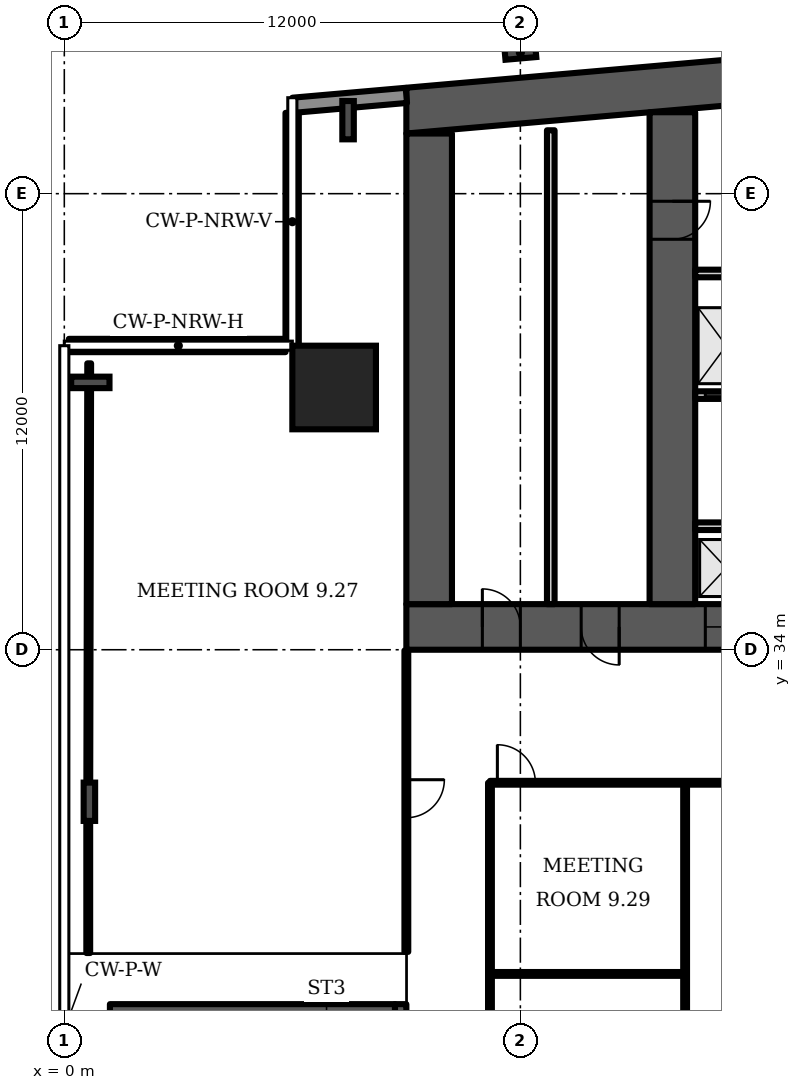
"""IFC4 building model, lengths in metres.
Left out: names, types, materials, properties, quantities, classifications, styles, units other than length and angle.
Written with IfcOpenShell. Run it as: python <this file> out.ifc"""

import sys

from ifc_helpers import new_model, si_unit, direction, frame, frame_2d, origin, origin_2d, place, context, subcontext, project, spatial, polyline, rectangle, i_section, outline, extrude, element, fill, save


model = new_model("IFC4")
c1 = context("Model", 3, precision=1e-05, world=origin(), true_north=direction((0.0, 1.0)))
c2 = subcontext(c1, "Body", "Model", "MODEL_VIEW")
j1 = project(units=[si_unit("LENGTHUNIT", "METRE"), si_unit("PLANEANGLEUNIT", "RADIAN")], contexts=[c1])
p1 = place(None, origin())
s1 = spatial("IfcSite", under=j1, at=p1, CompositionType="ELEMENT")
p2 = place(p1, origin())
s2 = spatial("IfcBuilding", under=s1, at=p2, CompositionType="ELEMENT")
p3 = place(p2, frame((0.0, 0.0, 52.3)))
s3 = spatial("IfcBuildingStorey", under=s2, at=p3, CompositionType="ELEMENT", Elevation=52.3)
p4 = place(p3, frame((0.0, 0.0, -0.0)))
e1 = element("IfcWall", 1, at=p4, inside=s3, PredefinedType="SHEAR", context=c2, shape_type="SweptSolid", body=[
    extrude(outline(polyline([(9.0, 47.583), (37.0, 50.032), (65.0, 47.583), (65.0, 48.787), (37.0, 51.237), (9.0, 48.787), (9.0, 47.583)])), origin(), (0.0, 0.0, 1.0), 3.6),
])
p5 = place(p3, frame((9.0, 34.6, 0.0), z_axis=(0.0, 0.0, 1.0), x_axis=(1.0, 0.0, 0.0)))
e2 = element("IfcWall", 2, at=p5, inside=s3, PredefinedType="SHEAR", context=c2, shape_type="SweptSolid", body=[
    extrude(rectangle(XDim=56.0, YDim=1.2, at=frame_2d((28.0, 0.0))), origin(), (0.0, 0.0, 1.0), 3.6),
])
p6 = place(p5, frame((2.0, 0.0, 0.0)))
e3 = element("IfcOpeningElement", 3, at=p6, cuts=e2, PredefinedType="OPENING", context=c2, shape_type="SweptSolid", body=[
    extrude(rectangle(XDim=1.0, YDim=2.1, at=frame_2d((0.5, 1.05))), frame((0.0, 0.61, 0.0), z_axis=(0.0, -1.0, 0.0), x_axis=(1.0, 0.0, 0.0)), (0.0, 0.0, 1.0), 1.22),
])
p7 = place(p5, frame((4.6, 0.0, 0.0)))
e4 = element("IfcOpeningElement", 4, at=p7, cuts=e2, PredefinedType="OPENING", context=c2, shape_type="SweptSolid", body=[
    extrude(rectangle(XDim=1.0, YDim=2.1, at=frame_2d((0.5, 1.05))), frame((0.0, 0.61, 0.0), z_axis=(0.0, -1.0, 0.0), x_axis=(1.0, 0.0, 0.0)), (0.0, 0.0, 1.0), 1.22),
])
p8 = place(p5, frame((7.867, 0.0, 0.0)))
e5 = element("IfcOpeningElement", 5, at=p8, cuts=e2, PredefinedType="OPENING", context=c2, shape_type="SweptSolid", body=[
    extrude(rectangle(XDim=1.1, YDim=2.1, at=frame_2d((0.55, 1.05))), frame((0.0, 0.61, 0.0), z_axis=(0.0, -1.0, 0.0), x_axis=(1.0, 0.0, 0.0)), (0.0, 0.0, 1.0), 1.22),
])
p9 = place(p5, frame((12.033, 0.0, 0.0)))
e6 = element("IfcOpeningElement", 6, at=p9, cuts=e2, PredefinedType="OPENING", context=c2, shape_type="SweptSolid", body=[
    extrude(rectangle(XDim=1.1, YDim=2.1, at=frame_2d((0.55, 1.05))), frame((0.0, 0.61, 0.0), z_axis=(0.0, -1.0, 0.0), x_axis=(1.0, 0.0, 0.0)), (0.0, 0.0, 1.0), 1.22),
])
p10 = place(p5, frame((9.8, 0.0, 0.0)))
e7 = element("IfcOpeningElement", 7, at=p10, cuts=e2, PredefinedType="OPENING", context=c2, shape_type="SweptSolid", body=[
    extrude(rectangle(XDim=1.4, YDim=2.1, at=frame_2d((0.7, 1.05))), frame((0.0, 0.61, 0.0), z_axis=(0.0, -1.0, 0.0), x_axis=(1.0, 0.0, 0.0)), (0.0, 0.0, 1.0), 1.22),
])
p11 = place(p5, frame((14.65, 0.0, 0.0)))
e8 = element("IfcOpeningElement", 8, at=p11, cuts=e2, PredefinedType="OPENING", context=c2, shape_type="SweptSolid", body=[
    extrude(rectangle(XDim=1.2, YDim=2.1, at=frame_2d((0.6, 1.05))), frame((0.0, 0.61, 0.0), z_axis=(0.0, -1.0, 0.0), x_axis=(1.0, 0.0, 0.0)), (0.0, 0.0, 1.0), 1.22),
])
p12 = place(p5, frame((21.867, 0.0, 0.0)))
e9 = element("IfcOpeningElement", 9, at=p12, cuts=e2, PredefinedType="OPENING", context=c2, shape_type="SweptSolid", body=[
    extrude(rectangle(XDim=1.1, YDim=2.1, at=frame_2d((0.55, 1.05))), frame((0.0, 0.61, 0.0), z_axis=(0.0, -1.0, 0.0), x_axis=(1.0, 0.0, 0.0)), (0.0, 0.0, 1.0), 1.22),
])
p13 = place(p5, frame((26.033, 0.0, 0.0)))
e10 = element("IfcOpeningElement", 10, at=p13, cuts=e2, PredefinedType="OPENING", context=c2, shape_type="SweptSolid", body=[
    extrude(rectangle(XDim=1.1, YDim=2.1, at=frame_2d((0.55, 1.05))), frame((0.0, 0.61, 0.0), z_axis=(0.0, -1.0, 0.0), x_axis=(1.0, 0.0, 0.0)), (0.0, 0.0, 1.0), 1.22),
])
p14 = place(p5, frame((23.8, 0.0, 0.0)))
e11 = element("IfcOpeningElement", 11, at=p14, cuts=e2, PredefinedType="OPENING", context=c2, shape_type="SweptSolid", body=[
    extrude(rectangle(XDim=1.4, YDim=2.1, at=frame_2d((0.7, 1.05))), frame((0.0, 0.61, 0.0), z_axis=(0.0, -1.0, 0.0), x_axis=(1.0, 0.0, 0.0)), (0.0, 0.0, 1.0), 1.22),
])
p15 = place(p5, frame((28.867, 0.0, 0.0)))
e12 = element("IfcOpeningElement", 12, at=p15, cuts=e2, PredefinedType="OPENING", context=c2, shape_type="SweptSolid", body=[
    extrude(rectangle(XDim=1.1, YDim=2.1, at=frame_2d((0.55, 1.05))), frame((0.0, 0.61, 0.0), z_axis=(0.0, -1.0, 0.0), x_axis=(1.0, 0.0, 0.0)), (0.0, 0.0, 1.0), 1.22),
])
p16 = place(p5, frame((33.033, 0.0, 0.0)))
e13 = element("IfcOpeningElement", 13, at=p16, cuts=e2, PredefinedType="OPENING", context=c2, shape_type="SweptSolid", body=[
    extrude(rectangle(XDim=1.1, YDim=2.1, at=frame_2d((0.55, 1.05))), frame((0.0, 0.61, 0.0), z_axis=(0.0, -1.0, 0.0), x_axis=(1.0, 0.0, 0.0)), (0.0, 0.0, 1.0), 1.22),
])
p17 = place(p5, frame((40.15, 0.0, 0.0)))
e14 = element("IfcOpeningElement", 14, at=p17, cuts=e2, PredefinedType="OPENING", context=c2, shape_type="SweptSolid", body=[
    extrude(rectangle(XDim=1.2, YDim=2.1, at=frame_2d((0.6, 1.05))), frame((0.0, 0.61, 0.0), z_axis=(0.0, -1.0, 0.0), x_axis=(1.0, 0.0, 0.0)), (0.0, 0.0, 1.0), 1.22),
])
p18 = place(p5, frame((44.8, 0.0, 0.0)))
e15 = element("IfcOpeningElement", 15, at=p18, cuts=e2, PredefinedType="OPENING", context=c2, shape_type="SweptSolid", body=[
    extrude(rectangle(XDim=1.4, YDim=2.1, at=frame_2d((0.7, 1.05))), frame((0.0, 0.61, 0.0), z_axis=(0.0, -1.0, 0.0), x_axis=(1.0, 0.0, 0.0)), (0.0, 0.0, 1.0), 1.22),
])
p19 = place(p5, frame((49.867, 0.0, 0.0)))
e16 = element("IfcOpeningElement", 16, at=p19, cuts=e2, PredefinedType="OPENING", context=c2, shape_type="SweptSolid", body=[
    extrude(rectangle(XDim=1.1, YDim=2.1, at=frame_2d((0.55, 1.05))), frame((0.0, 0.61, 0.0), z_axis=(0.0, -1.0, 0.0), x_axis=(1.0, 0.0, 0.0)), (0.0, 0.0, 1.0), 1.22),
])
p20 = place(p5, frame((53.5, 0.0, 0.0)))
e17 = element("IfcOpeningElement", 17, at=p20, cuts=e2, PredefinedType="OPENING", context=c2, shape_type="SweptSolid", body=[
    extrude(rectangle(XDim=1.1, YDim=2.1, at=frame_2d((0.55, 1.05))), frame((0.0, 0.61, 0.0), z_axis=(0.0, -1.0, 0.0), x_axis=(1.0, 0.0, 0.0)), (0.0, 0.0, 1.0), 1.22),
])
p21 = place(p5, frame((51.567, 0.0, 0.0)))
e18 = element("IfcOpeningElement", 18, at=p21, cuts=e2, PredefinedType="OPENING", context=c2, shape_type="SweptSolid", body=[
    extrude(rectangle(XDim=1.4, YDim=2.1, at=frame_2d((0.7, 1.05))), frame((0.0, 0.61, 0.0), z_axis=(0.0, -1.0, 0.0), x_axis=(1.0, 0.0, 0.0)), (0.0, 0.0, 1.0), 1.22),
])
p22 = place(p3, frame((9.6, 35.2, 0.0), z_axis=(0.0, 0.0, 1.0), x_axis=(0.0, 1.0, 0.0)))
e19 = element("IfcWall", 19, at=p22, inside=s3, PredefinedType="SHEAR", context=c2, shape_type="SweptSolid", body=[
    extrude(rectangle(XDim=12.383, YDim=1.2, at=frame_2d((6.191, 0.0))), origin(), (0.0, 0.0, 1.0), 3.6),
])
p23 = place(p3, frame((16.0, 35.2, 0.0), z_axis=(0.0, 0.0, 1.0), x_axis=(0.0, 1.0, 0.0)))
e20 = element("IfcWall", 20, at=p23, inside=s3, PredefinedType="SHEAR", context=c2, shape_type="SweptSolid", body=[
    extrude(rectangle(XDim=12.943, YDim=1.2, at=frame_2d((6.471, 0.0))), origin(), (0.0, 0.0, 1.0), 3.6),
])
p24 = place(p23, frame((9.6, 0.0, 0.0)))
e21 = element("IfcOpeningElement", 21, at=p24, cuts=e20, PredefinedType="OPENING", context=c2, shape_type="SweptSolid", body=[
    extrude(rectangle(XDim=1.0, YDim=2.1, at=frame_2d((0.5, 1.05))), frame((0.0, 0.61, 0.0), z_axis=(0.0, -1.0, 0.0), x_axis=(1.0, 0.0, 0.0)), (0.0, 0.0, 1.0), 1.22),
])
p25 = place(p3, frame((7.1, 40.9, 0.0), z_axis=(0.0, 0.0, 1.0), x_axis=(1.0, 0.0, 0.0)))
e22 = element("IfcColumn", 22, at=p25, inside=s3, PredefinedType="COLUMN", context=c2, shape_type="SweptSolid", body=[
    extrude(rectangle(XDim=2.2, YDim=2.2, at=origin_2d()), origin(), (0.0, 0.0, 1.0), 3.6),
])
for number, where, z_axis, x_axis in (
    (23, (7.467, 47.934, 0.0), (0.0, 0.0, 1.0), (-1.0, 0.0, 0.0)),
    (24, (0.685, 41.034, 0.0), (0.0, 0.0, 1.0), (0.0, 1.0, 0.0)),
    (25, (0.66, 30.0, 0.0), (0.0, 0.0, 1.0), (-1.0, 0.0, 0.0)),
):
    element("IfcColumn", number, at=place(p3, frame(where, z_axis=z_axis, x_axis=x_axis)), inside=s3, PredefinedType="COLUMN", context=c2, shape_type="SweptSolid", body=[
        extrude(i_section(OverallWidth=0.302, OverallDepth=1.008, WebThickness=0.021, FlangeThickness=0.04, FilletRadius=0.03, at=origin_2d()), origin(), (0.0, 0.0, 1.0), 3.6),
    ])
p26 = place(p3, frame((12.0, 49.71, 0.0), z_axis=(0.0, 0.0, 1.0), x_axis=(-0.087156, 0.996197, 0.0)))
e26 = element("IfcColumn", 26, at=p26, inside=s3, PredefinedType="COLUMN", context=c2, shape_type="SweptSolid", body=[
    extrude(i_section(OverallWidth=0.303, OverallDepth=0.814, WebThickness=0.021, FlangeThickness=0.04, FilletRadius=0.03, at=origin_2d()), origin(), (0.0, 0.0, 1.0), 3.6),
])
p27 = place(p3, frame((9.0, 48.587, 0.0), z_axis=(0.0, 0.0, 1.0), x_axis=(-0.996194, -0.087168, 0.0)))
e27 = element("IfcWall", 27, at=p27, inside=s3, PredefinedType="SOLIDWALL", context=c2, shape_type="SweptSolid", body=[
    extrude(rectangle(XDim=2.994, YDim=0.4, at=frame_2d((1.497, 0.0))), origin(), (0.0, 0.0, 1.0), 3.2),
])
p28 = place(p3, frame((5.995, 48.126, 0.0), z_axis=(0.0, 0.0, 1.0), x_axis=(0.0, -1.0, 0.0)))
e28 = element("IfcWall", 28, at=p28, inside=s3, PredefinedType="SOLIDWALL", context=c2, shape_type="SweptSolid", body=[
    extrude(rectangle(XDim=6.126, YDim=0.35, at=frame_2d((3.063, 0.0))), origin(), (0.0, 0.0, 1.0), 1.0),
])
p29 = place(p3, frame((5.82, 42.005, 0.0), z_axis=(0.0, 0.0, 1.0), x_axis=(-1.0, 0.0, 0.0)))
e29 = element("IfcWall", 29, at=p29, inside=s3, PredefinedType="SOLIDWALL", context=c2, shape_type="SweptSolid", body=[
    extrude(rectangle(XDim=5.7, YDim=0.35, at=frame_2d((2.85, 0.0))), origin(), (0.0, 0.0, 1.0), 1.0),
])
p30 = place(p3, frame((12.8, 35.2, 0.0), z_axis=(0.0, 0.0, 1.0), x_axis=(0.0, 1.0, 0.0)))
e30 = element("IfcWall", 30, at=p30, inside=s3, PredefinedType="PARTITIONING", context=c2, shape_type="SweptSolid", body=[
    extrude(rectangle(XDim=12.468, YDim=0.2, at=frame_2d((6.234, 0.0))), origin(), (0.0, 0.0, 1.0), 3.2),
])
p31 = place(p3, frame((16.6, 40.7, 0.0), z_axis=(0.0, 0.0, 1.0), x_axis=(1.0, 0.0, 0.0)))
e31 = element("IfcWall", 31, at=p31, inside=s3, PredefinedType="PARTITIONING", context=c2, shape_type="SweptSolid", body=[
    extrude(rectangle(XDim=5.8, YDim=0.2, at=frame_2d((2.9, 0.0))), origin(), (0.0, 0.0, 1.0), 3.2),
])
p32 = place(p31, frame((0.267, 0.0, 0.0)))
e32 = element("IfcOpeningElement", 32, at=p32, cuts=e31, PredefinedType="OPENING", context=c2, shape_type="SweptSolid", body=[
    extrude(rectangle(XDim=1.1, YDim=2.1, at=frame_2d((0.55, 1.05))), frame((0.0, 0.11, 0.0), z_axis=(0.0, -1.0, 0.0), x_axis=(1.0, 0.0, 0.0)), (0.0, 0.0, 1.0), 0.22),
])
p33 = place(p31, frame((2.35, 0.0, 0.0)))
e33 = element("IfcOpeningElement", 33, at=p33, cuts=e31, PredefinedType="OPENING", context=c2, shape_type="SweptSolid", body=[
    extrude(rectangle(XDim=1.1, YDim=2.1, at=frame_2d((0.55, 1.05))), frame((0.0, 0.11, 0.0), z_axis=(0.0, -1.0, 0.0), x_axis=(1.0, 0.0, 0.0)), (0.0, 0.0, 1.0), 0.22),
])
p34 = place(p31, frame((4.433, 0.0, 0.0)))
e34 = element("IfcOpeningElement", 34, at=p34, cuts=e31, PredefinedType="OPENING", context=c2, shape_type="SweptSolid", body=[
    extrude(rectangle(XDim=1.1, YDim=2.1, at=frame_2d((0.55, 1.05))), frame((0.0, 0.11, 0.0), z_axis=(0.0, -1.0, 0.0), x_axis=(1.0, 0.0, 0.0)), (0.0, 0.0, 1.0), 0.22),
])
p35 = place(p3, frame((0.0, 0.0, -0.0)))
e35 = element("IfcWall", 35, at=p35, inside=s3, PredefinedType="PARTITIONING", context=c2, shape_type="SweptSolid", body=[
    extrude(outline(polyline([(18.233, 37.15), (16.6, 37.15), (16.6, 37.35), (18.233, 37.35), (18.433, 37.35), (18.433, 35.2), (18.233, 35.2), (18.233, 37.15)])), origin(), (0.0, 0.0, 1.0), 3.2),
])
p36 = place(p3, frame((0.0, 0.0, -0.0)))
e36 = element("IfcWall", 36, at=p36, inside=s3, PredefinedType="PARTITIONING", context=c2, shape_type="SweptSolid", body=[
    extrude(outline(polyline([(18.433, 40.8), (18.233, 40.8), (18.233, 43.8), (16.6, 43.8), (16.6, 44.0), (22.4, 44.0), (22.4, 43.8), (20.767, 43.8), (20.767, 40.8), (20.567, 40.8), (20.567, 43.8), (18.433, 43.8), (18.433, 40.8)])), origin(), (0.0, 0.0, 1.0), 3.2),
])
p37 = place(p3, frame((8.85, 20.325, 0.0), z_axis=(0.0, 0.0, 1.0), x_axis=(0.0, 1.0, 0.0)))
e37 = element("IfcWall", 37, at=p37, inside=s3, PredefinedType="SHEAR", context=c2, shape_type="SweptSolid", body=[
    extrude(rectangle(XDim=4.35, YDim=0.3, at=frame_2d((2.175, 0.0))), origin(), (0.0, 0.0, 1.0), 3.2),
])
p38 = place(p37, frame((1.575, 0.0, 0.0)))
e38 = element("IfcOpeningElement", 38, at=p38, cuts=e37, PredefinedType="OPENING", context=c2, shape_type="SweptSolid", body=[
    extrude(rectangle(XDim=1.2, YDim=2.1, at=frame_2d((0.6, 1.05))), frame((0.0, 0.16, 0.0), z_axis=(0.0, -1.0, 0.0), x_axis=(1.0, 0.0, 0.0)), (0.0, 0.0, 1.0), 0.32),
])
p39 = place(p3, frame((0.63, 26.02, 0.0), z_axis=(0.0, 0.0, 1.0), x_axis=(0.0, 1.0, 0.0)))
e39 = element("IfcWall", 39, at=p39, inside=s3, PredefinedType="PARTITIONING", context=c2, shape_type="SweptSolid", body=[
    extrude(rectangle(XDim=3.98, YDim=0.1, at=frame_2d((1.99, 0.0))), origin(), (0.0, 0.0, 1.0), 2.58),
])
p40 = place(p3, frame((0.63, 30.0, 0.0), z_axis=(0.0, 0.0, 1.0), x_axis=(0.00218, 0.999994, 0.0)))
e40 = element("IfcWall", 40, at=p40, inside=s3, PredefinedType="PARTITIONING", context=c2, shape_type="SweptSolid", body=[
    extrude(rectangle(XDim=11.535, YDim=0.1, at=frame_2d((5.768, 0.0))), origin(), (0.0, 0.0, 1.0), 2.58),
])
p41 = place(p3, frame((9.0, 26.05, 0.0), z_axis=(0.0, 0.0, 1.0), x_axis=(0.0, 1.0, 0.0)))
e41 = element("IfcWall", 41, at=p41, inside=s3, PredefinedType="PARTITIONING", context=c2, shape_type="SweptSolid", body=[
    extrude(rectangle(XDim=7.93, YDim=0.1, at=frame_2d((3.965, 0.0))), origin(), (0.0, 0.0, 1.0), 3.2),
])
p42 = place(p41, frame((3.53, 0.0, 0.0)))
e42 = element("IfcOpeningElement", 42, at=p42, cuts=e41, PredefinedType="OPENING", context=c2, shape_type="SweptSolid", body=[
    extrude(rectangle(XDim=1.0, YDim=2.1, at=frame_2d((0.5, 1.05))), frame((0.0, 0.06, 0.0), z_axis=(0.0, -1.0, 0.0), x_axis=(1.0, 0.0, 0.0)), (0.0, 0.0, 1.0), 0.12),
])
p43 = place(p3, frame((11.2, 23.515, 0.0), z_axis=(0.0, 0.0, 1.0), x_axis=(0.0, 1.0, 0.0)))
e43 = element("IfcWall", 43, at=p43, inside=s3, PredefinedType="PARTITIONING", context=c2, shape_type="SweptSolid", body=[
    extrude(rectangle(XDim=6.985, YDim=0.1, at=frame_2d((3.493, 0.0))), origin(), (0.0, 0.0, 1.0), 3.2),
])
p44 = place(p3, frame((11.2, 25.47, 0.0), z_axis=(0.0, 0.0, 1.0), x_axis=(1.0, 0.0, 0.0)))
e44 = element("IfcWall", 44, at=p44, inside=s3, PredefinedType="PARTITIONING", context=c2, shape_type="SweptSolid", body=[
    extrude(rectangle(XDim=5.135, YDim=0.1, at=frame_2d((2.567, 0.0))), origin(), (0.0, 0.0, 1.0), 3.2),
])
p45 = place(p3, frame((11.2, 30.5, 0.0), z_axis=(0.0, 0.0, 1.0), x_axis=(1.0, 0.0, 0.0)))
e45 = element("IfcWall", 45, at=p45, inside=s3, PredefinedType="PARTITIONING", context=c2, shape_type="SweptSolid", body=[
    extrude(rectangle(XDim=25.65, YDim=0.1, at=frame_2d((12.825, 0.0))), origin(), (0.0, 0.0, 1.0), 3.2),
])
p46 = place(p45, frame((0.195, 0.0, 0.0)))
e46 = element("IfcOpeningElement", 46, at=p46, cuts=e45, PredefinedType="OPENING", context=c2, shape_type="SweptSolid", body=[
    extrude(rectangle(XDim=1.0, YDim=2.1, at=frame_2d((0.5, 1.05))), frame((0.0, 0.06, 0.0), z_axis=(0.0, -1.0, 0.0), x_axis=(1.0, 0.0, 0.0)), (0.0, 0.0, 1.0), 0.12),
])
p47 = place(p45, frame((14.755, 0.0, 0.0)))
e47 = element("IfcOpeningElement", 47, at=p47, cuts=e45, PredefinedType="OPENING", context=c2, shape_type="SweptSolid", body=[
    extrude(rectangle(XDim=1.0, YDim=2.1, at=frame_2d((0.5, 1.05))), frame((0.0, 0.06, 0.0), z_axis=(0.0, -1.0, 0.0), x_axis=(1.0, 0.0, 0.0)), (0.0, 0.0, 1.0), 0.12),
])
p48 = place(p45, frame((18.975, 0.0, 0.0)))
e48 = element("IfcOpeningElement", 48, at=p48, cuts=e45, PredefinedType="OPENING", context=c2, shape_type="SweptSolid", body=[
    extrude(rectangle(XDim=1.0, YDim=2.1, at=frame_2d((0.5, 1.05))), frame((0.0, 0.06, 0.0), z_axis=(0.0, -1.0, 0.0), x_axis=(1.0, 0.0, 0.0)), (0.0, 0.0, 1.0), 0.12),
])
p49 = place(p3, frame((16.335, 20.445, 0.0), z_axis=(0.0, 0.0, 1.0), x_axis=(0.0, 1.0, 0.0)))
e49 = element("IfcWall", 49, at=p49, inside=s3, PredefinedType="PARTITIONING", context=c2, shape_type="SweptSolid", body=[
    extrude(rectangle(XDim=10.055, YDim=0.1, at=frame_2d((5.027, 0.0))), origin(), (0.0, 0.0, 1.0), 3.2),
])
p50 = place(p3, frame((1.2, 24.525, 0.0), z_axis=(0.0, 0.0, 1.0), x_axis=(1.0, 0.0, 0.0)))
e50 = element("IfcWall", 50, at=p50, inside=s3, PredefinedType="SHEAR", context=c2, shape_type="SweptSolid", body=[
    extrude(rectangle(XDim=7.5, YDim=0.3, at=frame_2d((3.75, 0.0))), origin(), (0.0, 0.0, 1.0), 3.2),
])
p51 = place(p6, origin())
e51 = element("IfcDoor", 51, at=p51, inside=s3, OperationType="SINGLE_SWING_LEFT", PredefinedType="DOOR", context=c2, shape_type="SweptSolid", body=[
    extrude(rectangle(XDim=1.0, YDim=2.1, at=frame_2d((0.5, 1.05))), frame((0.0, 0.6, 0.0), z_axis=(0.0, -1.0, 0.0), x_axis=(1.0, 0.0, 0.0)), (0.0, 0.0, 1.0), 1.199),
])
fill(e3, e51)
p52 = place(p7, origin())
e52 = element("IfcDoor", 52, at=p52, inside=s3, OperationType="SINGLE_SWING_RIGHT", PredefinedType="DOOR", context=c2, shape_type="SweptSolid", body=[
    extrude(rectangle(XDim=1.0, YDim=2.1, at=frame_2d((0.5, 1.05))), frame((0.0, 0.6, 0.0), z_axis=(0.0, -1.0, 0.0), x_axis=(1.0, 0.0, 0.0)), (0.0, 0.0, 1.0), 1.199),
])
fill(e4, e52)
p53 = place(p8, origin())
e53 = element("IfcDoor", 53, at=p53, inside=s3, OperationType="DOUBLE_DOOR_SLIDING", PredefinedType="DOOR", context=c2, shape_type="SweptSolid", body=[
    extrude(rectangle(XDim=1.1, YDim=2.1, at=frame_2d((0.55, 1.05))), frame((0.0, 0.025, 0.0), z_axis=(0.0, -1.0, 0.0), x_axis=(1.0, 0.0, 0.0)), (0.0, 0.0, 1.0), 0.05),
])
fill(e5, e53)
p54 = place(p32, origin())
e54 = element("IfcDoor", 54, at=p54, inside=s3, OperationType="DOUBLE_DOOR_SLIDING", PredefinedType="DOOR", context=c2, shape_type="SweptSolid", body=[
    extrude(rectangle(XDim=1.1, YDim=2.1, at=frame_2d((0.55, 1.05))), frame((0.0, 0.025, 0.0), z_axis=(0.0, -1.0, 0.0), x_axis=(1.0, 0.0, 0.0)), (0.0, 0.0, 1.0), 0.05),
])
fill(e32, e54)
p55 = place(p24, origin())
e55 = element("IfcDoor", 55, at=p55, inside=s3, OperationType="SINGLE_SWING_RIGHT", PredefinedType="DOOR", context=c2, shape_type="SweptSolid", body=[
    extrude(rectangle(XDim=1.0, YDim=2.1, at=frame_2d((0.5, 1.05))), frame((0.0, 0.6, 0.0), z_axis=(0.0, -1.0, 0.0), x_axis=(1.0, 0.0, 0.0)), (0.0, 0.0, 1.0), 1.199),
])
fill(e21, e55)
p56 = place(p42, origin())
e56 = element("IfcDoor", 56, at=p56, inside=s3, OperationType="SINGLE_SWING_RIGHT", PredefinedType="DOOR", context=c2, shape_type="SweptSolid", body=[
    extrude(rectangle(XDim=1.0, YDim=2.1, at=frame_2d((0.5, 1.05))), frame((0.0, 0.025, 0.0), z_axis=(0.0, -1.0, 0.0), x_axis=(1.0, 0.0, 0.0)), (0.0, 0.0, 1.0), 0.05),
])
fill(e42, e56)
p57 = place(p46, origin())
e57 = element("IfcDoor", 57, at=p57, inside=s3, OperationType="SINGLE_SWING_LEFT", PredefinedType="DOOR", context=c2, shape_type="SweptSolid", body=[
    extrude(rectangle(XDim=1.0, YDim=2.1, at=frame_2d((0.5, 1.05))), frame((0.0, 0.025, 0.0), z_axis=(0.0, -1.0, 0.0), x_axis=(1.0, 0.0, 0.0)), (0.0, 0.0, 1.0), 0.05),
])
fill(e46, e57)
save(model, sys.argv[1])
